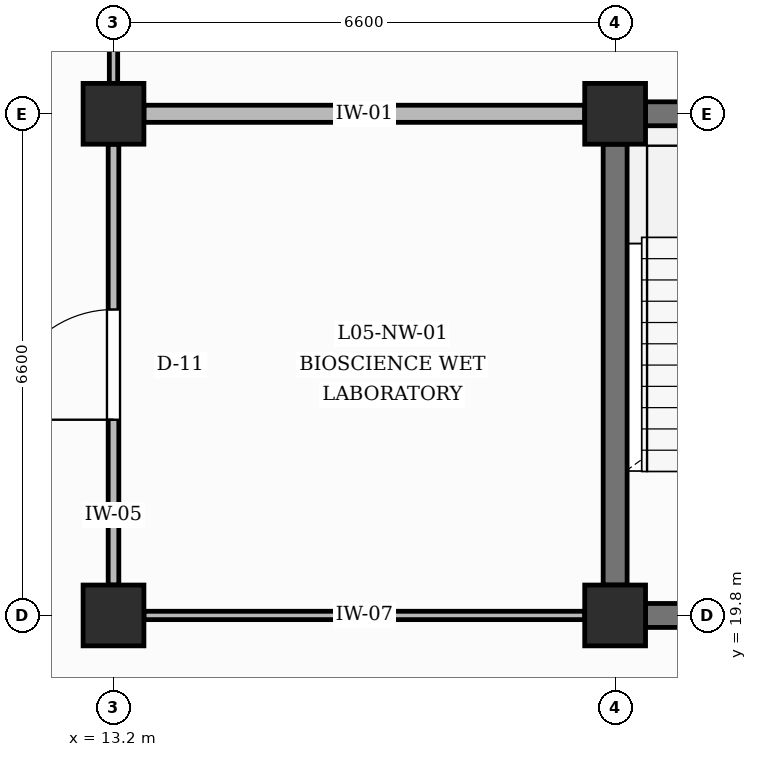
"""IFC4 building model, lengths in metres.
Left out: names, types, materials, properties, quantities, classifications, styles, units other than length and angle.
Written with IfcOpenShell. Run it as: python <this file> out.ifc"""

import sys

from ifc_helpers import new_model, si_unit, direction, frame, frame_2d, origin, origin_2d, place, context, subcontext, project, spatial, rectangle, extrude, element, fill, save


model = new_model("IFC4")
c1 = context("Model", 3, precision=1e-05, world=origin(), true_north=direction((0.0, 1.0)))
c2 = subcontext(c1, "Body", "Model", "MODEL_VIEW")
j1 = project(units=[si_unit("LENGTHUNIT", "METRE"), si_unit("PLANEANGLEUNIT", "RADIAN")], contexts=[c1])
p1 = place(None, origin())
s1 = spatial("IfcSite", under=j1, at=p1, CompositionType="ELEMENT")
p2 = place(p1, origin())
s2 = spatial("IfcBuilding", under=s1, at=p2, CompositionType="ELEMENT")
p3 = place(p2, frame((0.0, 0.0, 22.8)))
s3 = spatial("IfcBuildingStorey", under=s2, at=p3, CompositionType="ELEMENT", Elevation=22.8)
for number, where, z_axis, x_axis in (
    (1, (13.2, 19.8, 0.0), (0.0, 0.0, 1.0), (1.0, 0.0, 0.0)),
    (2, (13.2, 26.4, 0.0), (0.0, 0.0, 1.0), (1.0, 0.0, 0.0)),
    (3, (19.8, 19.8, 0.0), (0.0, 0.0, 1.0), (1.0, 0.0, 0.0)),
    (4, (19.8, 26.4, 0.0), (0.0, 0.0, 1.0), (1.0, 0.0, 0.0)),
):
    element("IfcColumn", number, at=place(p3, frame(where, z_axis=z_axis, x_axis=x_axis)), inside=s3, PredefinedType="COLUMN", context=c2, shape_type="SweptSolid", body=[
        extrude(rectangle(XDim=0.8, YDim=0.8, at=origin_2d()), origin(), (0.0, 0.0, 1.0), 4.2),
    ])
p4 = place(p3, frame((20.2, 19.8, 0.0), z_axis=(0.0, 0.0, 1.0), x_axis=(1.0, 0.0, 0.0)))
e5 = element("IfcWall", 5, at=p4, inside=s3, PredefinedType="SHEAR", context=c2, shape_type="SweptSolid", body=[
    extrude(rectangle(XDim=5.8, YDim=0.315, at=frame_2d((2.9, 0.0))), origin(), (0.0, 0.0, 1.0), 3.17),
])
p5 = place(p4, frame((2.35, 0.0, 0.0)))
e6 = element("IfcOpeningElement", 6, at=p5, cuts=e5, PredefinedType="OPENING", context=c2, shape_type="SweptSolid", body=[
    extrude(rectangle(XDim=1.1, YDim=2.15, at=frame_2d((0.55, 1.075))), frame((0.0, 0.167, 0.0), z_axis=(0.0, -1.0, 0.0), x_axis=(1.0, 0.0, 0.0)), (0.0, 0.0, 1.0), 0.335),
])
p6 = place(p3, frame((20.2, 26.4, 0.0), z_axis=(0.0, 0.0, 1.0), x_axis=(1.0, 0.0, 0.0)))
e7 = element("IfcWall", 7, at=p6, inside=s3, PredefinedType="SHEAR", context=c2, shape_type="SweptSolid", body=[
    extrude(rectangle(XDim=5.825, YDim=0.315, at=frame_2d((2.913, 0.0))), origin(), (0.0, 0.0, 1.0), 3.17),
])
p7 = place(p3, frame((19.8, 20.2, 0.0), z_axis=(0.0, 0.0, 1.0), x_axis=(0.0, 1.0, 0.0)))
e8 = element("IfcWall", 8, at=p7, inside=s3, PredefinedType="SHEAR", context=c2, shape_type="SweptSolid", body=[
    extrude(rectangle(XDim=5.8, YDim=0.315, at=frame_2d((2.9, 0.0))), origin(), (0.0, 0.0, 1.0), 3.17),
])
p8 = place(p3, frame((13.2, 20.2, 0.0), z_axis=(0.0, 0.0, 1.0), x_axis=(0.0, 1.0, 0.0)))
e9 = element("IfcWall", 9, at=p8, inside=s3, PredefinedType="PARTITIONING", context=c2, shape_type="SweptSolid", body=[
    extrude(rectangle(XDim=5.8, YDim=0.14, at=frame_2d((2.9, 0.0))), origin(), (0.0, 0.0, 1.0), 3.17),
])
p9 = place(p8, frame((2.175, 0.0, 0.0)))
e10 = element("IfcOpeningElement", 10, at=p9, cuts=e9, PredefinedType="OPENING", context=c2, shape_type="SweptSolid", body=[
    extrude(rectangle(XDim=1.45, YDim=2.25, at=frame_2d((0.725, 1.125))), frame((0.0, 0.08, 0.0), z_axis=(0.0, -1.0, 0.0), x_axis=(1.0, 0.0, 0.0)), (0.0, 0.0, 1.0), 0.16),
])
p10 = place(p3, frame((13.2, 26.8, 0.0), z_axis=(0.0, 0.0, 1.0), x_axis=(0.0, 1.0, 0.0)))
e11 = element("IfcWall", 11, at=p10, inside=s3, PredefinedType="PARTITIONING", context=c2, shape_type="SweptSolid", body=[
    extrude(rectangle(XDim=5.8, YDim=0.11, at=frame_2d((2.9, 0.0))), origin(), (0.0, 0.0, 1.0), 3.17),
])
p11 = place(p10, frame((2.2, 0.0, 0.0)))
e12 = element("IfcOpeningElement", 12, at=p11, cuts=e11, PredefinedType="OPENING", context=c2, shape_type="SweptSolid", body=[
    extrude(rectangle(XDim=1.4, YDim=2.25, at=frame_2d((0.7, 1.125))), frame((0.0, 0.065, 0.0), z_axis=(0.0, -1.0, 0.0), x_axis=(1.0, 0.0, 0.0)), (0.0, 0.0, 1.0), 0.13),
])
p12 = place(p3, frame((13.6, 19.8, 0.0), z_axis=(0.0, 0.0, 1.0), x_axis=(1.0, 0.0, 0.0)))
e13 = element("IfcWall", 13, at=p12, inside=s3, PredefinedType="PARTITIONING", context=c2, shape_type="SweptSolid", body=[
    extrude(rectangle(XDim=5.8, YDim=0.11, at=frame_2d((2.9, 0.0))), origin(), (0.0, 0.0, 1.0), 3.17),
])
p13 = place(p3, frame((13.6, 26.4, 0.0), z_axis=(0.0, 0.0, 1.0), x_axis=(1.0, 0.0, 0.0)))
e14 = element("IfcWall", 14, at=p13, inside=s3, PredefinedType="PARTITIONING", context=c2, shape_type="SweptSolid", body=[
    extrude(rectangle(XDim=5.8, YDim=0.225, at=frame_2d((2.9, 0.0))), origin(), (0.0, 0.0, 1.0), 3.17),
])
p14 = place(p9, origin())
e15 = element("IfcDoor", 15, at=p14, inside=s3, OperationType="SINGLE_SWING_LEFT", PredefinedType="DOOR", context=c2, shape_type="SweptSolid", body=[
    extrude(rectangle(XDim=1.45, YDim=2.25, at=frame_2d((0.725, 1.125))), frame((0.0, 0.025, 0.0), z_axis=(0.0, -1.0, 0.0), x_axis=(1.0, 0.0, 0.0)), (0.0, 0.0, 1.0), 0.05),
])
fill(e10, e15)
save(model, sys.argv[1])
